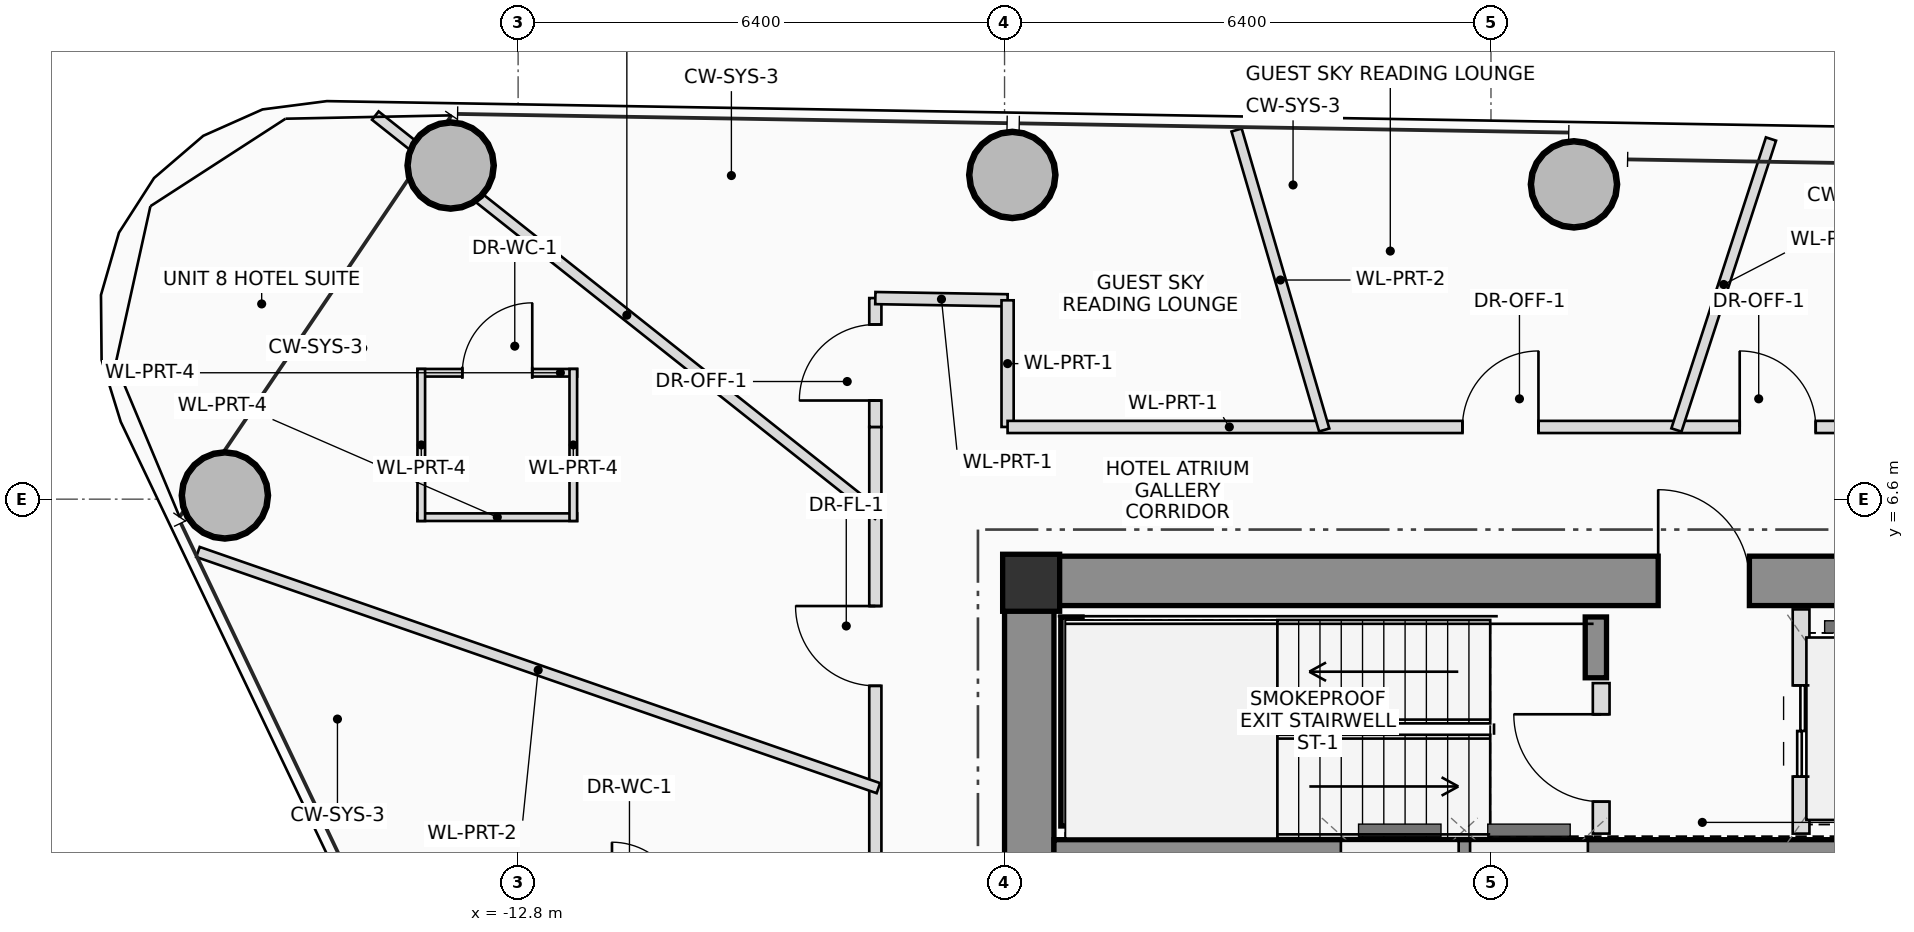
"""IFC4 building model, lengths in metres.
Left out: names, types, materials, properties, quantities, classifications, styles, units other than length and angle.
Written with IfcOpenShell. Run it as: python <this file> out.ifc"""

import sys

from ifc_helpers import new_model, si_unit, direction, frame, frame_2d, origin, origin_2d, place, context, subcontext, project, spatial, rectangle, hollow_circle, extrude, source, transform, mapped, element, fill, save


model = new_model("IFC4")
c1 = context("Model", 3, precision=1e-05, world=origin(), true_north=direction((0.0, 1.0)))
c2 = subcontext(c1, "Body", "Model", "MODEL_VIEW")
j1 = project(units=[si_unit("LENGTHUNIT", "METRE"), si_unit("PLANEANGLEUNIT", "RADIAN")], contexts=[c1])
p1 = place(None, origin())
s1 = spatial("IfcSite", under=j1, at=p1, CompositionType="ELEMENT")
p2 = place(p1, origin())
s2 = spatial("IfcBuilding", under=s1, at=p2, CompositionType="ELEMENT")
p3 = place(p2, frame((0.0, 0.0, 205.25)))
s3 = spatial("IfcBuildingStorey", under=s2, at=p3, CompositionType="ELEMENT", Elevation=205.25)
m1 = source(origin(), c2, "Body", "SweptSolid", [
    extrude(rectangle(XDim=0.75, YDim=0.75, at=origin_2d()), origin(), (0.0, 0.0, 1.0), 3.45),
])
p4 = place(p3, frame((-6.05, 5.5, 0.0), z_axis=(0.0, 0.0, 1.0), x_axis=(1.0, 0.0, 0.0)))
e1 = element("IfcColumn", 1, at=p4, inside=s3, PredefinedType="COLUMN", context=c2, shape_type="MappedRepresentation", body=[
    mapped(m1, transform((0.0, 0.0, 0.0), scale=1.0)),
])
p5 = place(p3, frame((-6.4, 5.525, 0.0), z_axis=(0.0, 0.0, 1.0), x_axis=(1.0, 0.0, 0.0)))
e2 = element("IfcWall", 2, at=p5, inside=s3, PredefinedType="SHEAR", context=c2, shape_type="SweptSolid", body=[
    extrude(rectangle(XDim=12.8, YDim=0.65, at=frame_2d((6.4, 0.0))), origin(), (0.0, 0.0, 1.0), 3.45),
])
p6 = place(p5, frame((8.6, 0.0, 0.0)))
e3 = element("IfcOpeningElement", 3, at=p6, cuts=e2, PredefinedType="OPENING", context=c2, shape_type="SweptSolid", body=[
    extrude(rectangle(XDim=1.2, YDim=2.2, at=frame_2d((0.6, 1.1))), frame((0.0, 0.335, 0.0), z_axis=(0.0, -1.0, 0.0), x_axis=(1.0, 0.0, 0.0)), (0.0, 0.0, 1.0), 0.67),
])
p7 = place(p3, frame((-6.075, 1.75, 0.0), z_axis=(0.0, 0.0, 1.0), x_axis=(0.0, 1.0, 0.0)))
e4 = element("IfcWall", 4, at=p7, inside=s3, PredefinedType="SHEAR", context=c2, shape_type="SweptSolid", body=[
    extrude(rectangle(XDim=3.45, YDim=0.65, at=frame_2d((1.725, 0.0))), origin(), (0.0, 0.0, 1.0), 3.45),
])
p8 = place(p3, frame((-5.75, 1.94, 0.0), z_axis=(0.0, 0.0, 1.0), x_axis=(1.0, 0.0, 0.0)))
e5 = element("IfcWall", 5, at=p8, inside=s3, PredefinedType="SHEAR", context=c2, shape_type="SweptSolid", body=[
    extrude(rectangle(XDim=11.5, YDim=0.36, at=frame_2d((5.75, 0.0))), origin(), (0.0, 0.0, 1.0), 3.45),
])
p9 = place(p3, frame((-5.52, 2.3, 0.0), z_axis=(0.0, 0.0, 1.0), x_axis=(0.0, 1.0, 0.0)))
e6 = element("IfcWall", 6, at=p9, inside=s3, PredefinedType="SHEAR", context=c2, shape_type="SweptSolid", body=[
    extrude(rectangle(XDim=2.75, YDim=0.28, at=frame_2d((1.375, 0.0))), origin(), (0.0, 0.0, 1.0), 3.45),
])
p10 = place(p3, frame((1.38, 4.25, 0.0), z_axis=(0.0, 0.0, 1.0), x_axis=(0.0, 1.0, 0.0)))
e7 = element("IfcWall", 7, at=p10, inside=s3, PredefinedType="SHEAR", context=c2, shape_type="SweptSolid", body=[
    extrude(rectangle(XDim=0.8, YDim=0.28, at=frame_2d((0.4, 0.0))), origin(), (0.0, 0.0, 1.0), 3.45),
])
m2 = source(origin(), c2, "Body", "SweptSolid", [
    extrude(hollow_circle(Radius=0.575, WallThickness=0.042, at=origin_2d()), origin(), (0.0, 0.0, 1.0), 3.45),
])
for number, where, z_axis, x_axis in (
    (8, (1.092, 10.742, 0.0), (0.0, 0.0, 1.0), (1.0, 0.0, 0.0)),
    (9, (-6.298, 10.865, 0.0), (0.0, 0.0, 1.0), (1.0, 0.0, 0.0)),
    (10, (-13.688, 10.99, 0.0), (0.0, 0.0, 1.0), (1.0, 0.0, 0.0)),
    (11, (-16.658, 6.649, 0.0), (0.0, 0.0, 1.0), (1.0, 0.0, 0.0)),
):
    element("IfcColumn", number, at=place(p3, frame(where, z_axis=z_axis, x_axis=x_axis)), inside=s3, PredefinedType="COLUMN", context=c2, shape_type="MappedRepresentation", body=[
        mapped(m2, transform((0.0, 0.0, 0.0), scale=1.0)),
    ])
p11 = place(p3, frame((1.45, 2.2, 0.0), z_axis=(0.0, 0.0, 1.0), x_axis=(0.0, 1.0, 0.0)))
e12 = element("IfcWall", 12, at=p11, inside=s3, PredefinedType="PLUMBINGWALL", context=c2, shape_type="SweptSolid", body=[
    extrude(rectangle(XDim=1.98, YDim=0.22, at=frame_2d((0.99, 0.0))), origin(), (0.0, 0.0, 1.0), 3.25),
])
p12 = place(p11, frame((0.42, 0.0, 0.0)))
e13 = element("IfcOpeningElement", 13, at=p12, cuts=e12, PredefinedType="OPENING", context=c2, shape_type="SweptSolid", body=[
    extrude(rectangle(XDim=1.15, YDim=2.15, at=frame_2d((0.575, 1.075))), frame((0.0, 0.12, 0.0), z_axis=(0.0, -1.0, 0.0), x_axis=(1.0, 0.0, 0.0)), (0.0, 0.0, 1.0), 0.24),
])
p13 = place(p3, frame((4.08, 2.2, 0.0), z_axis=(0.0, 0.0, 1.0), x_axis=(0.0, 1.0, 0.0)))
e14 = element("IfcWall", 14, at=p13, inside=s3, PredefinedType="PLUMBINGWALL", context=c2, shape_type="SweptSolid", body=[
    extrude(rectangle(XDim=2.95, YDim=0.22, at=frame_2d((1.475, 0.0))), origin(), (0.0, 0.0, 1.0), 3.25),
])
p14 = place(p13, frame((0.75, 0.0, 0.0)))
e15 = element("IfcOpeningElement", 15, at=p14, cuts=e14, PredefinedType="OPENING", context=c2, shape_type="SweptSolid", body=[
    extrude(rectangle(XDim=1.2, YDim=2.25, at=frame_2d((0.6, 1.125))), frame((0.0, 0.12, 0.0), z_axis=(0.0, -1.0, 0.0), x_axis=(1.0, 0.0, 0.0)), (0.0, 0.0, 1.0), 0.24),
])
p15 = place(p3, frame((-14.124, 8.263, 0.0), z_axis=(0.0, 0.0, 1.0), x_axis=(1.0, 0.0, 0.0)))
e16 = element("IfcWall", 16, at=p15, inside=s3, PredefinedType="PARTITIONING", context=c2, shape_type="SweptSolid", body=[
    extrude(rectangle(XDim=2.1, YDim=0.1, at=frame_2d((1.05, 0.0))), origin(), (0.0, 0.0, 1.0), 3.25),
])
p16 = place(p15, frame((0.59, 0.0, 0.0)))
e17 = element("IfcOpeningElement", 17, at=p16, cuts=e16, PredefinedType="OPENING", context=c2, shape_type="SweptSolid", body=[
    extrude(rectangle(XDim=0.92, YDim=2.1, at=frame_2d((0.46, 1.05))), frame((0.0, 0.06, 0.0), z_axis=(0.0, -1.0, 0.0), x_axis=(1.0, 0.0, 0.0)), (0.0, 0.0, 1.0), 0.12),
])
p17 = place(p3, frame((-12.024, 6.363, 0.0), z_axis=(0.0, 0.0, 1.0), x_axis=(-1.0, 0.0, 0.0)))
e18 = element("IfcWall", 18, at=p17, inside=s3, PredefinedType="PARTITIONING", context=c2, shape_type="SweptSolid", body=[
    extrude(rectangle(XDim=2.1, YDim=0.1, at=frame_2d((1.05, 0.0))), origin(), (0.0, 0.0, 1.0), 2.605),
])
p18 = place(p3, frame((-12.074, 8.313, 0.0), z_axis=(0.0, 0.0, 1.0), x_axis=(0.0, -1.0, 0.0)))
e19 = element("IfcWall", 19, at=p18, inside=s3, PredefinedType="PARTITIONING", context=c2, shape_type="SweptSolid", body=[
    extrude(rectangle(XDim=2.0, YDim=0.1, at=frame_2d((1.0, 0.0))), origin(), (0.0, 0.0, 1.0), 2.905),
])
p19 = place(p3, frame((-14.074, 6.313, 0.0), z_axis=(0.0, 0.0, 1.0), x_axis=(0.0, 1.0, 0.0)))
e20 = element("IfcWall", 20, at=p19, inside=s3, PredefinedType="PARTITIONING", context=c2, shape_type="SweptSolid", body=[
    extrude(rectangle(XDim=2.0, YDim=0.1, at=frame_2d((1.0, 0.0))), origin(), (0.0, 0.0, 1.0), 2.605),
])
p20 = place(p3, frame((-8.1, -7.46, 0.0), z_axis=(0.0, 0.0, 1.0), x_axis=(0.0, 1.0, 0.0)))
e21 = element("IfcWall", 21, at=p20, inside=s3, PredefinedType="PARTITIONING", context=c2, shape_type="SweptSolid", body=[
    extrude(rectangle(XDim=15.01, YDim=0.16, at=frame_2d((7.505, 0.0))), origin(), (0.0, 0.0, 1.0), 2.605),
])
p21 = place(p20, frame((1.537, 0.0, 0.0)))
e22 = element("IfcOpeningElement", 22, at=p21, cuts=e21, PredefinedType="OPENING", context=c2, shape_type="SweptSolid", body=[
    extrude(rectangle(XDim=0.9, YDim=2.05, at=frame_2d((0.45, 1.025))), frame((0.0, 0.09, 0.0), z_axis=(0.0, -1.0, 0.0), x_axis=(1.0, 0.0, 0.0)), (0.0, 0.0, 1.0), 0.18),
])
p22 = place(p20, frame((6.522, 0.0, 0.0)))
e23 = element("IfcOpeningElement", 23, at=p22, cuts=e21, PredefinedType="OPENING", context=c2, shape_type="SweptSolid", body=[
    extrude(rectangle(XDim=1.05, YDim=2.2, at=frame_2d((0.525, 1.1))), frame((0.0, 0.09, 0.0), z_axis=(0.0, -1.0, 0.0), x_axis=(1.0, 0.0, 0.0)), (0.0, 0.0, 1.0), 0.18),
])
p23 = place(p20, frame((11.604, 0.0, 0.0)))
e24 = element("IfcOpeningElement", 24, at=p23, cuts=e21, PredefinedType="OPENING", context=c2, shape_type="SweptSolid", body=[
    extrude(rectangle(XDim=1.05, YDim=2.2, at=frame_2d((0.525, 1.1))), frame((0.0, 0.09, 0.0), z_axis=(0.0, -1.0, 0.0), x_axis=(1.0, 0.0, 0.0)), (0.0, 0.0, 1.0), 0.18),
])
p24 = place(p3, frame((-8.1, 7.55, 0.0), z_axis=(0.0, 0.0, 1.0), x_axis=(0.0, 1.0, 0.0)))
e25 = element("IfcWall", 25, at=p24, inside=s3, PredefinedType="PARTITIONING", context=c2, shape_type="SweptSolid", body=[
    extrude(rectangle(XDim=1.696, YDim=0.16, at=frame_2d((0.848, 0.0))), origin(), (0.0, 0.0, 1.0), 2.805),
])
p25 = place(p24, frame((0.348, 0.0, 0.0)))
e26 = element("IfcOpeningElement", 26, at=p25, cuts=e25, PredefinedType="OPENING", context=c2, shape_type="SweptSolid", body=[
    extrude(rectangle(XDim=1.0, YDim=2.25, at=frame_2d((0.5, 1.125))), frame((0.0, 0.09, 0.0), z_axis=(0.0, -1.0, 0.0), x_axis=(1.0, 0.0, 0.0)), (0.0, 0.0, 1.0), 0.18),
])
p26 = place(p3, frame((-8.1, 9.246, 0.0), z_axis=(0.0, 0.0, 1.0), x_axis=(0.999858281466, -0.016834992813, 0.0)))
e27 = element("IfcWall", 27, at=p26, inside=s3, PredefinedType="PARTITIONING", context=c2, shape_type="SweptSolid", body=[
    extrude(rectangle(XDim=1.74, YDim=0.16, at=frame_2d((0.87, 0.0))), origin(), (0.0, 0.0, 1.0), 2.905),
])
p27 = place(p3, frame((-6.36, 9.216, 0.0), z_axis=(0.0, 0.0, 1.0), x_axis=(0.0, -1.0, 0.0)))
e28 = element("IfcWall", 28, at=p27, inside=s3, PredefinedType="PARTITIONING", context=c2, shape_type="SweptSolid", body=[
    extrude(rectangle(XDim=1.666, YDim=0.16, at=frame_2d((0.833, 0.0))), origin(), (0.0, 0.0, 1.0), 2.605),
])
p28 = place(p3, frame((-6.36, 7.55, 0.0), z_axis=(0.0, 0.0, 1.0), x_axis=(1.0, 0.0, 0.0)))
e29 = element("IfcWall", 29, at=p28, inside=s3, PredefinedType="PARTITIONING", context=c2, shape_type="SweptSolid", body=[
    extrude(rectangle(XDim=11.61, YDim=0.16, at=frame_2d((5.805, 0.0))), origin(), (0.0, 0.0, 1.0), 2.605),
])
p29 = place(p28, frame((5.985, 0.0, 0.0)))
e30 = element("IfcOpeningElement", 30, at=p29, cuts=e29, PredefinedType="OPENING", context=c2, shape_type="SweptSolid", body=[
    extrude(rectangle(XDim=1.0, YDim=2.25, at=frame_2d((0.5, 1.125))), frame((0.0, 0.09, 0.0), z_axis=(0.0, -1.0, 0.0), x_axis=(1.0, 0.0, 0.0)), (0.0, 0.0, 1.0), 0.18),
])
p30 = place(p28, frame((9.633, 0.0, 0.0)))
e31 = element("IfcOpeningElement", 31, at=p30, cuts=e29, PredefinedType="OPENING", context=c2, shape_type="SweptSolid", body=[
    extrude(rectangle(XDim=1.0, YDim=2.25, at=frame_2d((0.5, 1.125))), frame((0.0, 0.09, 0.0), z_axis=(0.0, -1.0, 0.0), x_axis=(1.0, 0.0, 0.0)), (0.0, 0.0, 1.0), 0.18),
])
p31 = place(p3, frame((2.44, 7.51, 0.0), z_axis=(0.0, 0.0, 1.0), x_axis=(0.309013387048, 0.951057688379, 0.0)))
e32 = element("IfcWall", 32, at=p31, inside=s3, PredefinedType="PARTITIONING", context=c2, shape_type="SweptSolid", body=[
    extrude(rectangle(XDim=4.025, YDim=0.14, at=frame_2d((2.013, 0.0))), origin(), (0.0, 0.0, 1.0), 2.605),
])
p32 = place(p3, frame((-2.194, 7.51, 0.0), z_axis=(0.0, 0.0, 1.0), x_axis=(-0.280410435425, 0.959880194454, 0.0)))
e33 = element("IfcWall", 33, at=p32, inside=s3, PredefinedType="PARTITIONING", context=c2, shape_type="SweptSolid", body=[
    extrude(rectangle(XDim=4.111, YDim=0.14, at=frame_2d((2.056, 0.0))), origin(), (0.0, 0.0, 1.0), 2.765),
])
p33 = place(p3, frame((-8.06, 6.395, 0.0), z_axis=(0.0, 0.0, 1.0), x_axis=(-0.783385602556, 0.621535998723, 0.0)))
e34 = element("IfcWall", 34, at=p33, inside=s3, PredefinedType="PARTITIONING", context=c2, shape_type="SweptSolid", body=[
    extrude(rectangle(XDim=8.449, YDim=0.14, at=frame_2d((4.224, 0.0))), origin(), (0.0, 0.0, 1.0), 2.605),
])
p34 = place(p3, frame((-8.06, 2.798, 0.0), z_axis=(0.0, 0.0, 1.0), x_axis=(-0.944705149401, 0.327920997643, 0.0)))
e35 = element("IfcWall", 35, at=p34, inside=s3, PredefinedType="PARTITIONING", context=c2, shape_type="SweptSolid", body=[
    extrude(rectangle(XDim=9.476, YDim=0.14, at=frame_2d((4.738, 0.0))), origin(), (0.0, 0.0, 1.0), 2.605),
])
p35 = place(p6, origin())
e36 = element("IfcDoor", 36, at=p35, inside=s3, OperationType="SINGLE_SWING_LEFT", PredefinedType="DOOR", context=c2, shape_type="SweptSolid", body=[
    extrude(rectangle(XDim=1.2, YDim=2.2, at=frame_2d((0.6, 1.1))), frame((0.0, 0.025, 0.0), z_axis=(0.0, -1.0, 0.0), x_axis=(1.0, 0.0, 0.0)), (0.0, 0.0, 1.0), 0.05),
])
fill(e3, e36)
p36 = place(p12, origin())
e37 = element("IfcDoor", 37, at=p36, inside=s3, OperationType="SINGLE_SWING_RIGHT", PredefinedType="DOOR", context=c2, shape_type="SweptSolid", body=[
    extrude(rectangle(XDim=1.15, YDim=2.15, at=frame_2d((0.575, 1.075))), frame((0.0, 0.025, 0.0), z_axis=(0.0, -1.0, 0.0), x_axis=(1.0, 0.0, 0.0)), (0.0, 0.0, 1.0), 0.05),
])
fill(e13, e37)
p37 = place(p14, origin())
e38 = element("IfcDoor", 38, at=p37, inside=s3, OperationType="DOUBLE_DOOR_SLIDING", PredefinedType="DOOR", context=c2, shape_type="SweptSolid", body=[
    extrude(rectangle(XDim=1.2, YDim=2.25, at=frame_2d((0.6, 1.125))), frame((0.0, 0.025, 0.0), z_axis=(0.0, -1.0, 0.0), x_axis=(1.0, 0.0, 0.0)), (0.0, 0.0, 1.0), 0.05),
])
fill(e15, e38)
p38 = place(p16, origin())
e39 = element("IfcDoor", 39, at=p38, inside=s3, OperationType="SINGLE_SWING_RIGHT", PredefinedType="DOOR", context=c2, shape_type="SweptSolid", body=[
    extrude(rectangle(XDim=0.92, YDim=2.1, at=frame_2d((0.46, 1.05))), frame((0.0, 0.025, 0.0), z_axis=(0.0, -1.0, 0.0), x_axis=(1.0, 0.0, 0.0)), (0.0, 0.0, 1.0), 0.05),
])
fill(e17, e39)
p39 = place(p23, origin())
e40 = element("IfcDoor", 40, at=p39, inside=s3, OperationType="SINGLE_SWING_RIGHT", PredefinedType="DOOR", context=c2, shape_type="SweptSolid", body=[
    extrude(rectangle(XDim=1.05, YDim=2.2, at=frame_2d((0.525, 1.1))), frame((0.0, 0.025, 0.0), z_axis=(0.0, -1.0, 0.0), x_axis=(1.0, 0.0, 0.0)), (0.0, 0.0, 1.0), 0.05),
])
fill(e24, e40)
p40 = place(p25, origin())
e41 = element("IfcDoor", 41, at=p40, inside=s3, OperationType="SINGLE_SWING_LEFT", PredefinedType="DOOR", context=c2, shape_type="SweptSolid", body=[
    extrude(rectangle(XDim=1.0, YDim=2.25, at=frame_2d((0.5, 1.125))), frame((0.0, 0.025, 0.0), z_axis=(0.0, -1.0, 0.0), x_axis=(1.0, 0.0, 0.0)), (0.0, 0.0, 1.0), 0.05),
])
fill(e26, e41)
p41 = place(p29, origin())
e42 = element("IfcDoor", 42, at=p41, inside=s3, OperationType="SINGLE_SWING_RIGHT", PredefinedType="DOOR", context=c2, shape_type="SweptSolid", body=[
    extrude(rectangle(XDim=1.0, YDim=2.25, at=frame_2d((0.5, 1.125))), frame((0.0, 0.025, 0.0), z_axis=(0.0, -1.0, 0.0), x_axis=(1.0, 0.0, 0.0)), (0.0, 0.0, 1.0), 0.05),
])
fill(e30, e42)
p42 = place(p30, origin())
e43 = element("IfcDoor", 43, at=p42, inside=s3, OperationType="SINGLE_SWING_LEFT", PredefinedType="DOOR", context=c2, shape_type="SweptSolid", body=[
    extrude(rectangle(XDim=1.0, YDim=2.25, at=frame_2d((0.5, 1.125))), frame((0.0, 0.025, 0.0), z_axis=(0.0, -1.0, 0.0), x_axis=(1.0, 0.0, 0.0)), (0.0, 0.0, 1.0), 0.05),
])
fill(e31, e43)
save(model, sys.argv[1])
